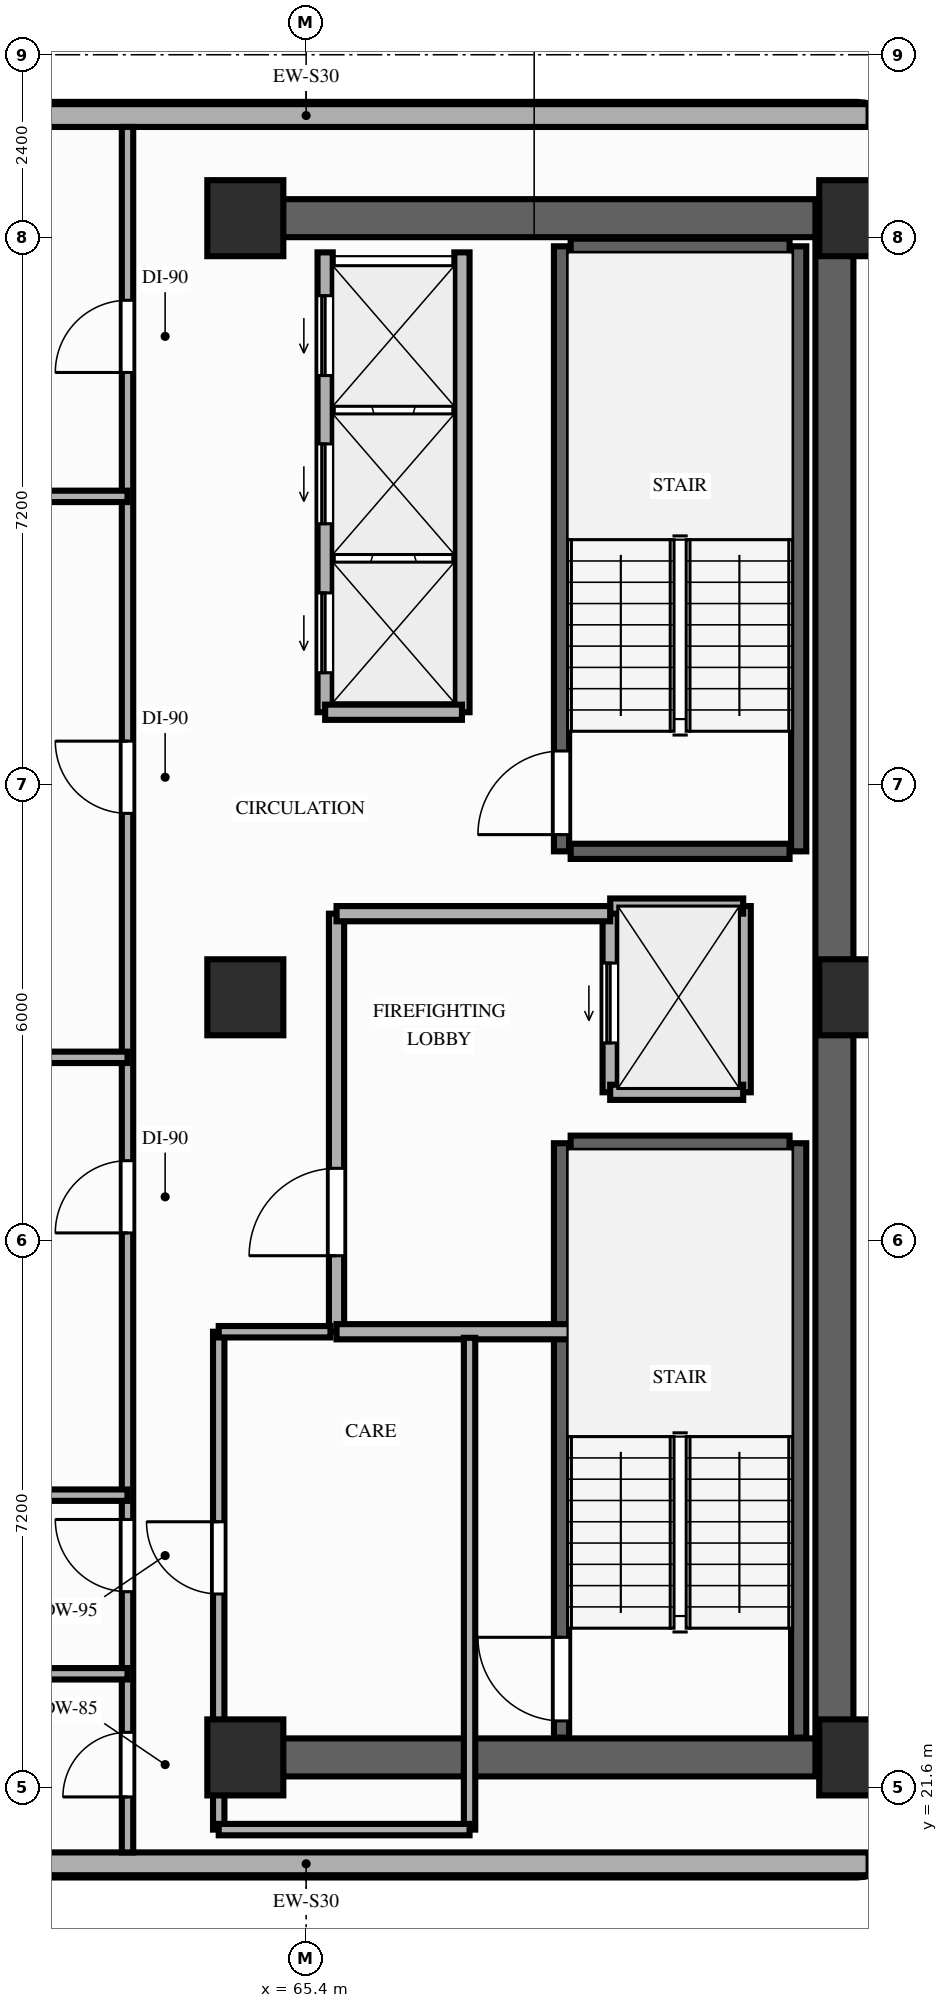
"""IFC4 building model, lengths in metres.
Left out: names, types, materials, properties, quantities, classifications, styles, units other than length and angle.
Written with IfcOpenShell. Run it as: python <this file> out.ifc"""

import sys

from ifc_helpers import new_model, si_unit, direction, frame, frame_2d, origin, origin_2d, place, context, subcontext, project, spatial, rectangle, extrude, element, fill, save


model = new_model("IFC4")
c1 = context("Model", 3, precision=1e-05, world=origin(), true_north=direction((0.0, 1.0)))
c2 = subcontext(c1, "Body", "Model", "MODEL_VIEW")
j1 = project(units=[si_unit("LENGTHUNIT", "METRE"), si_unit("PLANEANGLEUNIT", "RADIAN")], contexts=[c1])
p1 = place(None, origin())
s1 = spatial("IfcSite", under=j1, at=p1, CompositionType="ELEMENT")
p2 = place(p1, origin())
s2 = spatial("IfcBuilding", under=s1, at=p2, CompositionType="ELEMENT")
p3 = place(p2, frame((0.0, 0.0, 93.0)))
s3 = spatial("IfcBuildingStorey", under=s2, at=p3, CompositionType="ELEMENT", Elevation=93.0)
for number, where, z_axis, x_axis in (
    (1, (64.6, 22.0, 0.0), (0.0, 0.0, 1.0), (1.0, 0.0, 0.0)),
    (2, (72.65, 22.0, 0.0), (0.0, 0.0, 1.0), (1.0, 0.0, 0.0)),
    (3, (64.6, 32.0, 0.0), (0.0, 0.0, 1.0), (1.0, 0.0, 0.0)),
    (4, (72.65, 32.0, 0.0), (0.0, 0.0, 1.0), (1.0, 0.0, 0.0)),
    (5, (64.6, 42.25, 0.0), (0.0, 0.0, 1.0), (1.0, 0.0, 0.0)),
    (6, (72.65, 42.25, 0.0), (0.0, 0.0, 1.0), (1.0, 0.0, 0.0)),
):
    element("IfcColumn", number, at=place(p3, frame(where, z_axis=z_axis, x_axis=x_axis)), inside=s3, PredefinedType="COLUMN", context=c2, shape_type="SweptSolid", body=[
        extrude(rectangle(XDim=1.0, YDim=1.0, at=origin_2d()), origin(), (0.0, 0.0, 1.0), 3.2),
    ])
for number, where, z_axis, x_axis in (
    (7, (72.8, 43.6, 0.0), (0.0, 0.0, 1.0), (-1.0, 0.0, 0.0)),
    (8, (58.0, 20.6, 0.0), (0.0, 0.0, 1.0), (1.0, 0.0, 0.0)),
):
    element("IfcWall", number, at=place(p3, frame(where, z_axis=z_axis, x_axis=x_axis)), inside=s3, PredefinedType="STANDARD", context=c2, shape_type="SweptSolid", body=[
        extrude(rectangle(XDim=14.8, YDim=0.3, at=frame_2d((7.4, 0.0))), origin(), (0.0, 0.0, 1.0), 3.02),
    ])
p4 = place(p3, frame((72.35, 22.0, 0.0), z_axis=(0.0, 0.0, 1.0), x_axis=(0.0, 1.0, 0.0)))
e9 = element("IfcWall", 9, at=p4, inside=s3, PredefinedType="SHEAR", context=c2, shape_type="SweptSolid", body=[
    extrude(rectangle(XDim=20.25, YDim=0.5, at=frame_2d((10.125, 0.0))), origin(), (0.0, 0.0, 1.0), 3.02),
])
for number, where, z_axis, x_axis in (
    (10, (64.6, 42.25, 0.0), (0.0, 0.0, 1.0), (1.0, 0.0, 0.0)),
    (11, (64.6, 22.0, 0.0), (0.0, 0.0, 1.0), (1.0, 0.0, 0.0)),
):
    element("IfcWall", number, at=place(p3, frame(where, z_axis=z_axis, x_axis=x_axis)), inside=s3, PredefinedType="SHEAR", context=c2, shape_type="SweptSolid", body=[
        extrude(rectangle(XDim=7.5, YDim=0.5, at=frame_2d((3.75, 0.0))), origin(), (0.0, 0.0, 1.0), 3.02),
    ])
p5 = place(p3, frame((68.76, 22.26, 0.0), z_axis=(0.0, 0.0, 1.0), x_axis=(0.0, 1.0, 0.0)))
e12 = element("IfcWall", 12, at=p5, inside=s3, PredefinedType="SHEAR", context=c2, shape_type="SweptSolid", body=[
    extrude(rectangle(XDim=7.82, YDim=0.2, at=frame_2d((3.91, 0.0))), origin(), (0.0, 0.0, 1.0), 3.02),
])
p6 = place(p5, frame((0.22, 0.0, 0.0)))
e13 = element("IfcOpeningElement", 13, at=p6, cuts=e12, PredefinedType="OPENING", context=c2, shape_type="SweptSolid", body=[
    extrude(rectangle(XDim=1.1, YDim=2.15, at=frame_2d((0.55, 1.075))), frame((0.0, 0.11, 0.0), z_axis=(0.0, -1.0, 0.0), x_axis=(1.0, 0.0, 0.0)), (0.0, 0.0, 1.0), 0.22),
])
p7 = place(p3, frame((71.88, 22.26, 0.0), z_axis=(0.0, 0.0, 1.0), x_axis=(0.0, 1.0, 0.0)))
e14 = element("IfcWall", 14, at=p7, inside=s3, PredefinedType="SHEAR", context=c2, shape_type="SweptSolid", body=[
    extrude(rectangle(XDim=7.82, YDim=0.2, at=frame_2d((3.91, 0.0))), origin(), (0.0, 0.0, 1.0), 3.02),
])
p8 = place(p3, frame((68.88, 30.08, 0.0), z_axis=(0.0, 0.0, 1.0), x_axis=(1.0, 0.0, 0.0)))
e15 = element("IfcWall", 15, at=p8, inside=s3, PredefinedType="SHEAR", context=c2, shape_type="SweptSolid", body=[
    extrude(rectangle(XDim=2.88, YDim=0.2, at=frame_2d((1.44, 0.0))), origin(), (0.0, 0.0, 1.0), 3.02),
])
p9 = place(p3, frame((68.76, 33.92, 0.0), z_axis=(0.0, 0.0, 1.0), x_axis=(0.0, 1.0, 0.0)))
e16 = element("IfcWall", 16, at=p9, inside=s3, PredefinedType="SHEAR", context=c2, shape_type="SweptSolid", body=[
    extrude(rectangle(XDim=7.96, YDim=0.2, at=frame_2d((3.98, 0.0))), origin(), (0.0, 0.0, 1.0), 3.02),
])
p10 = place(p9, frame((0.22, 0.0, 0.0)))
e17 = element("IfcOpeningElement", 17, at=p10, cuts=e16, PredefinedType="OPENING", context=c2, shape_type="SweptSolid", body=[
    extrude(rectangle(XDim=1.1, YDim=2.15, at=frame_2d((0.55, 1.075))), frame((0.0, 0.11, 0.0), z_axis=(0.0, -1.0, 0.0), x_axis=(1.0, 0.0, 0.0)), (0.0, 0.0, 1.0), 0.22),
])
p11 = place(p3, frame((71.88, 33.92, 0.0), z_axis=(0.0, 0.0, 1.0), x_axis=(0.0, 1.0, 0.0)))
e18 = element("IfcWall", 18, at=p11, inside=s3, PredefinedType="SHEAR", context=c2, shape_type="SweptSolid", body=[
    extrude(rectangle(XDim=7.96, YDim=0.2, at=frame_2d((3.98, 0.0))), origin(), (0.0, 0.0, 1.0), 3.02),
])
for number, where, z_axis, x_axis in (
    (19, (68.88, 41.88, 0.0), (0.0, 0.0, 1.0), (1.0, 0.0, 0.0)),
    (20, (68.88, 33.92, 0.0), (0.0, 0.0, 1.0), (1.0, 0.0, 0.0)),
):
    element("IfcWall", number, at=place(p3, frame(where, z_axis=z_axis, x_axis=x_axis)), inside=s3, PredefinedType="SHEAR", context=c2, shape_type="SweptSolid", body=[
        extrude(rectangle(XDim=2.88, YDim=0.2, at=frame_2d((1.44, 0.0))), origin(), (0.0, 0.0, 1.0), 3.02),
    ])
p12 = place(p3, frame((65.65, 35.75, 0.0), z_axis=(0.0, 0.0, 1.0), x_axis=(0.0, 1.0, 0.0)))
e21 = element("IfcWall", 21, at=p12, inside=s3, PredefinedType="MOVABLE", context=c2, shape_type="SweptSolid", body=[
    extrude(rectangle(XDim=6.05, YDim=0.2, at=frame_2d((3.025, 0.0))), origin(), (0.0, 0.0, 1.0), 3.02),
])
p13 = place(p12, frame((0.52, 0.0, 0.0)))
e22 = element("IfcOpeningElement", 22, at=p13, cuts=e21, PredefinedType="OPENING", context=c2, shape_type="SweptSolid", body=[
    extrude(rectangle(XDim=1.05, YDim=2.15, at=frame_2d((0.525, 1.075))), frame((0.0, 0.11, 0.0), z_axis=(0.0, -1.0, 0.0), x_axis=(1.0, 0.0, 0.0)), (0.0, 0.0, 1.0), 0.22),
])
p14 = place(p12, frame((2.48, 0.0, 0.0)))
e23 = element("IfcOpeningElement", 23, at=p14, cuts=e21, PredefinedType="OPENING", context=c2, shape_type="SweptSolid", body=[
    extrude(rectangle(XDim=1.05, YDim=2.15, at=frame_2d((0.525, 1.075))), frame((0.0, 0.11, 0.0), z_axis=(0.0, -1.0, 0.0), x_axis=(1.0, 0.0, 0.0)), (0.0, 0.0, 1.0), 0.22),
])
p15 = place(p12, frame((4.43, 0.0, 0.0)))
e24 = element("IfcOpeningElement", 24, at=p15, cuts=e21, PredefinedType="OPENING", context=c2, shape_type="SweptSolid", body=[
    extrude(rectangle(XDim=1.05, YDim=2.15, at=frame_2d((0.525, 1.075))), frame((0.0, 0.11, 0.0), z_axis=(0.0, -1.0, 0.0), x_axis=(1.0, 0.0, 0.0)), (0.0, 0.0, 1.0), 0.22),
])
p16 = place(p3, frame((67.45, 35.75, 0.0), z_axis=(0.0, 0.0, 1.0), x_axis=(0.0, 1.0, 0.0)))
e25 = element("IfcWall", 25, at=p16, inside=s3, PredefinedType="MOVABLE", context=c2, shape_type="SweptSolid", body=[
    extrude(rectangle(XDim=6.05, YDim=0.2, at=frame_2d((3.025, 0.0))), origin(), (0.0, 0.0, 1.0), 3.02),
])
p17 = place(p3, frame((65.65, 35.75, 0.0), z_axis=(0.0, 0.0, 1.0), x_axis=(1.0, 0.0, 0.0)))
e26 = element("IfcWall", 26, at=p17, inside=s3, PredefinedType="MOVABLE", context=c2, shape_type="SweptSolid", body=[
    extrude(rectangle(XDim=1.8, YDim=0.2, at=frame_2d((0.9, 0.0))), origin(), (0.0, 0.0, 1.0), 3.02),
])
p18 = place(p3, frame((69.4, 30.75, 0.0), z_axis=(0.0, 0.0, 1.0), x_axis=(0.0, 1.0, 0.0)))
e27 = element("IfcWall", 27, at=p18, inside=s3, PredefinedType="MOVABLE", context=c2, shape_type="SweptSolid", body=[
    extrude(rectangle(XDim=2.45, YDim=0.2, at=frame_2d((1.225, 0.0))), origin(), (0.0, 0.0, 1.0), 3.02),
])
p19 = place(p18, frame((0.65, 0.0, 0.0)))
e28 = element("IfcOpeningElement", 28, at=p19, cuts=e27, PredefinedType="OPENING", context=c2, shape_type="SweptSolid", body=[
    extrude(rectangle(XDim=1.05, YDim=2.15, at=frame_2d((0.525, 1.075))), frame((0.0, 0.11, 0.0), z_axis=(0.0, -1.0, 0.0), x_axis=(1.0, 0.0, 0.0)), (0.0, 0.0, 1.0), 0.22),
])
p20 = place(p3, frame((71.15, 30.75, 0.0), z_axis=(0.0, 0.0, 1.0), x_axis=(0.0, 1.0, 0.0)))
e29 = element("IfcWall", 29, at=p20, inside=s3, PredefinedType="MOVABLE", context=c2, shape_type="SweptSolid", body=[
    extrude(rectangle(XDim=2.45, YDim=0.2, at=frame_2d((1.225, 0.0))), origin(), (0.0, 0.0, 1.0), 3.02),
])
for number, where, z_axis, x_axis in (
    (30, (69.4, 33.2, 0.0), (0.0, 0.0, 1.0), (1.0, 0.0, 0.0)),
    (31, (69.4, 30.75, 0.0), (0.0, 0.0, 1.0), (1.0, 0.0, 0.0)),
):
    element("IfcWall", number, at=place(p3, frame(where, z_axis=z_axis, x_axis=x_axis)), inside=s3, PredefinedType="MOVABLE", context=c2, shape_type="SweptSolid", body=[
        extrude(rectangle(XDim=1.75, YDim=0.2, at=frame_2d((0.875, 0.0))), origin(), (0.0, 0.0, 1.0), 3.02),
    ])
p21 = place(p3, frame((65.8, 27.6, 0.0), z_axis=(0.0, 0.0, 1.0), x_axis=(0.0, 1.0, 0.0)))
e32 = element("IfcWall", 32, at=p21, inside=s3, PredefinedType="PARTITIONING", context=c2, shape_type="SweptSolid", body=[
    extrude(rectangle(XDim=5.5, YDim=0.2, at=frame_2d((2.75, 0.0))), origin(), (0.0, 0.0, 1.0), 3.02),
])
p22 = place(p21, frame((1.0, 0.0, 0.0)))
e33 = element("IfcOpeningElement", 33, at=p22, cuts=e32, PredefinedType="OPENING", context=c2, shape_type="SweptSolid", body=[
    extrude(rectangle(XDim=1.15, YDim=2.15, at=frame_2d((0.575, 1.075))), frame((0.0, 0.11, 0.0), z_axis=(0.0, -1.0, 0.0), x_axis=(1.0, 0.0, 0.0)), (0.0, 0.0, 1.0), 0.22),
])
p23 = place(p3, frame((65.8, 33.1, 0.0), z_axis=(0.0, 0.0, 1.0), x_axis=(1.0, 0.0, 0.0)))
e34 = element("IfcWall", 34, at=p23, inside=s3, PredefinedType="PARTITIONING", context=c2, shape_type="SweptSolid", body=[
    extrude(rectangle(XDim=3.6, YDim=0.2, at=frame_2d((1.8, 0.0))), origin(), (0.0, 0.0, 1.0), 3.02),
])
p24 = place(p3, frame((65.8, 27.6, 0.0), z_axis=(0.0, 0.0, 1.0), x_axis=(1.0, 0.0, 0.0)))
e35 = element("IfcWall", 35, at=p24, inside=s3, PredefinedType="PARTITIONING", context=c2, shape_type="SweptSolid", body=[
    extrude(rectangle(XDim=3.4, YDim=0.2, at=frame_2d((1.7, 0.0))), origin(), (0.0, 0.0, 1.0), 3.02),
])
p25 = place(p3, frame((64.25, 21.05, 0.0), z_axis=(0.0, 0.0, 1.0), x_axis=(0.0, 1.0, 0.0)))
e36 = element("IfcWall", 36, at=p25, inside=s3, PredefinedType="PARTITIONING", context=c2, shape_type="SweptSolid", body=[
    extrude(rectangle(XDim=6.55, YDim=0.15, at=frame_2d((3.275, 0.0))), origin(), (0.0, 0.0, 1.0), 2.6),
])
p26 = place(p25, frame((3.1, 0.0, 0.0)))
e37 = element("IfcOpeningElement", 37, at=p26, cuts=e36, PredefinedType="OPENING", context=c2, shape_type="SweptSolid", body=[
    extrude(rectangle(XDim=0.95, YDim=2.15, at=frame_2d((0.475, 1.075))), frame((0.0, 0.085, 0.0), z_axis=(0.0, -1.0, 0.0), x_axis=(1.0, 0.0, 0.0)), (0.0, 0.0, 1.0), 0.17),
])
p27 = place(p3, frame((67.55, 21.05, 0.0), z_axis=(0.0, 0.0, 1.0), x_axis=(0.0, 1.0, 0.0)))
e38 = element("IfcWall", 38, at=p27, inside=s3, PredefinedType="PARTITIONING", context=c2, shape_type="SweptSolid", body=[
    extrude(rectangle(XDim=6.47, YDim=0.15, at=frame_2d((3.235, 0.0))), origin(), (0.0, 0.0, 1.0), 2.6),
])
p28 = place(p3, frame((64.25, 21.05, 0.0), z_axis=(0.0, 0.0, 1.0), x_axis=(1.0, 0.0, 0.0)))
e39 = element("IfcWall", 39, at=p28, inside=s3, PredefinedType="PARTITIONING", context=c2, shape_type="SweptSolid", body=[
    extrude(rectangle(XDim=3.3, YDim=0.15, at=frame_2d((1.65, 0.0))), origin(), (0.0, 0.0, 1.0), 3.02),
])
p29 = place(p3, frame((64.25, 27.6, 0.0), z_axis=(0.0, 0.0, 1.0), x_axis=(1.0, 0.0, 0.0)))
e40 = element("IfcWall", 40, at=p29, inside=s3, PredefinedType="PARTITIONING", context=c2, shape_type="SweptSolid", body=[
    extrude(rectangle(XDim=1.47, YDim=0.15, at=frame_2d((0.735, 0.0))), origin(), (0.0, 0.0, 1.0), 2.6),
])
p30 = place(p3, frame((63.05, 20.75, 0.0), z_axis=(0.0, 0.0, 1.0), x_axis=(0.0, 1.0, 0.0)))
e41 = element("IfcWall", 41, at=p30, inside=s3, PredefinedType="PARTITIONING", context=c2, shape_type="SweptSolid", body=[
    extrude(rectangle(XDim=22.7, YDim=0.15, at=frame_2d((11.35, 0.0))), origin(), (0.0, 0.0, 1.0), 2.6),
])
p31 = place(p30, frame((0.73, 0.0, 0.0)))
e42 = element("IfcOpeningElement", 42, at=p31, cuts=e41, PredefinedType="OPENING", context=c2, shape_type="SweptSolid", body=[
    extrude(rectangle(XDim=0.85, YDim=2.1, at=frame_2d((0.425, 1.05))), frame((0.0, 0.085, 0.0), z_axis=(0.0, -1.0, 0.0), x_axis=(1.0, 0.0, 0.0)), (0.0, 0.0, 1.0), 0.17),
])
p32 = place(p30, frame((3.43, 0.0, 0.0)))
e43 = element("IfcOpeningElement", 43, at=p32, cuts=e41, PredefinedType="OPENING", context=c2, shape_type="SweptSolid", body=[
    extrude(rectangle(XDim=0.95, YDim=2.1, at=frame_2d((0.475, 1.05))), frame((0.0, 0.085, 0.0), z_axis=(0.0, -1.0, 0.0), x_axis=(1.0, 0.0, 0.0)), (0.0, 0.0, 1.0), 0.17),
])
p33 = place(p30, frame((8.15, 0.0, 0.0)))
e44 = element("IfcOpeningElement", 44, at=p33, cuts=e41, PredefinedType="OPENING", context=c2, shape_type="SweptSolid", body=[
    extrude(rectangle(XDim=0.95, YDim=2.15, at=frame_2d((0.475, 1.075))), frame((0.0, 0.085, 0.0), z_axis=(0.0, -1.0, 0.0), x_axis=(1.0, 0.0, 0.0)), (0.0, 0.0, 1.0), 0.17),
])
p34 = place(p30, frame((13.67, 0.0, 0.0)))
e45 = element("IfcOpeningElement", 45, at=p34, cuts=e41, PredefinedType="OPENING", context=c2, shape_type="SweptSolid", body=[
    extrude(rectangle(XDim=0.95, YDim=2.15, at=frame_2d((0.475, 1.075))), frame((0.0, 0.085, 0.0), z_axis=(0.0, -1.0, 0.0), x_axis=(1.0, 0.0, 0.0)), (0.0, 0.0, 1.0), 0.17),
])
p35 = place(p30, frame((19.47, 0.0, 0.0)))
e46 = element("IfcOpeningElement", 46, at=p35, cuts=e41, PredefinedType="OPENING", context=c2, shape_type="SweptSolid", body=[
    extrude(rectangle(XDim=0.95, YDim=2.15, at=frame_2d((0.475, 1.075))), frame((0.0, 0.085, 0.0), z_axis=(0.0, -1.0, 0.0), x_axis=(1.0, 0.0, 0.0)), (0.0, 0.0, 1.0), 0.17),
])
for number, where, z_axis, x_axis in (
    (47, (57.95, 23.1, 0.0), (0.0, 0.0, 1.0), (1.0, 0.0, 0.0)),
    (48, (57.95, 25.45, 0.0), (0.0, 0.0, 1.0), (1.0, 0.0, 0.0)),
    (49, (57.95, 31.21, 0.0), (0.0, 0.0, 1.0), (1.0, 0.0, 0.0)),
    (50, (57.95, 38.59, 0.0), (0.0, 0.0, 1.0), (1.0, 0.0, 0.0)),
):
    element("IfcWall", number, at=place(p3, frame(where, z_axis=z_axis, x_axis=x_axis)), inside=s3, PredefinedType="PARTITIONING", context=c2, shape_type="SweptSolid", body=[
        extrude(rectangle(XDim=5.1, YDim=0.15, at=frame_2d((2.55, 0.0))), origin(), (0.0, 0.0, 1.0), 2.6),
    ])
p36 = place(p6, origin())
e51 = element("IfcDoor", 51, at=p36, inside=s3, OperationType="SINGLE_SWING_RIGHT", PredefinedType="DOOR", context=c2, shape_type="SweptSolid", body=[
    extrude(rectangle(XDim=1.1, YDim=2.15, at=frame_2d((0.55, 1.075))), frame((0.0, 0.025, 0.0), z_axis=(0.0, -1.0, 0.0), x_axis=(1.0, 0.0, 0.0)), (0.0, 0.0, 1.0), 0.05),
])
fill(e13, e51)
p37 = place(p10, origin())
e52 = element("IfcDoor", 52, at=p37, inside=s3, OperationType="SINGLE_SWING_LEFT", PredefinedType="DOOR", context=c2, shape_type="SweptSolid", body=[
    extrude(rectangle(XDim=1.1, YDim=2.15, at=frame_2d((0.55, 1.075))), frame((0.0, 0.025, 0.0), z_axis=(0.0, -1.0, 0.0), x_axis=(1.0, 0.0, 0.0)), (0.0, 0.0, 1.0), 0.05),
])
fill(e17, e52)
p38 = place(p13, origin())
e53 = element("IfcDoor", 53, at=p38, inside=s3, OperationType="SLIDING_TO_LEFT", PredefinedType="DOOR", context=c2, shape_type="SweptSolid", body=[
    extrude(rectangle(XDim=1.05, YDim=2.15, at=frame_2d((0.525, 1.075))), frame((0.0, 0.025, 0.0), z_axis=(0.0, -1.0, 0.0), x_axis=(1.0, 0.0, 0.0)), (0.0, 0.0, 1.0), 0.05),
])
fill(e22, e53)
p39 = place(p14, origin())
e54 = element("IfcDoor", 54, at=p39, inside=s3, OperationType="SLIDING_TO_LEFT", PredefinedType="DOOR", context=c2, shape_type="SweptSolid", body=[
    extrude(rectangle(XDim=1.05, YDim=2.15, at=frame_2d((0.525, 1.075))), frame((0.0, 0.025, 0.0), z_axis=(0.0, -1.0, 0.0), x_axis=(1.0, 0.0, 0.0)), (0.0, 0.0, 1.0), 0.05),
])
fill(e23, e54)
p40 = place(p15, origin())
e55 = element("IfcDoor", 55, at=p40, inside=s3, OperationType="SLIDING_TO_LEFT", PredefinedType="DOOR", context=c2, shape_type="SweptSolid", body=[
    extrude(rectangle(XDim=1.05, YDim=2.15, at=frame_2d((0.525, 1.075))), frame((0.0, 0.025, 0.0), z_axis=(0.0, -1.0, 0.0), x_axis=(1.0, 0.0, 0.0)), (0.0, 0.0, 1.0), 0.05),
])
fill(e24, e55)
p41 = place(p19, origin())
e56 = element("IfcDoor", 56, at=p41, inside=s3, OperationType="SLIDING_TO_LEFT", PredefinedType="DOOR", context=c2, shape_type="SweptSolid", body=[
    extrude(rectangle(XDim=1.05, YDim=2.15, at=frame_2d((0.525, 1.075))), frame((0.0, 0.025, 0.0), z_axis=(0.0, -1.0, 0.0), x_axis=(1.0, 0.0, 0.0)), (0.0, 0.0, 1.0), 0.05),
])
fill(e28, e56)
p42 = place(p22, origin())
e57 = element("IfcDoor", 57, at=p42, inside=s3, OperationType="SINGLE_SWING_LEFT", PredefinedType="DOOR", context=c2, shape_type="SweptSolid", body=[
    extrude(rectangle(XDim=1.15, YDim=2.15, at=frame_2d((0.575, 1.075))), frame((0.0, 0.025, 0.0), z_axis=(0.0, -1.0, 0.0), x_axis=(1.0, 0.0, 0.0)), (0.0, 0.0, 1.0), 0.05),
])
fill(e33, e57)
p43 = place(p26, origin())
e58 = element("IfcDoor", 58, at=p43, inside=s3, OperationType="SINGLE_SWING_RIGHT", PredefinedType="DOOR", context=c2, shape_type="SweptSolid", body=[
    extrude(rectangle(XDim=0.95, YDim=2.15, at=frame_2d((0.475, 1.075))), frame((0.0, 0.025, 0.0), z_axis=(0.0, -1.0, 0.0), x_axis=(1.0, 0.0, 0.0)), (0.0, 0.0, 1.0), 0.05),
])
fill(e37, e58)
p44 = place(p31, origin())
e59 = element("IfcDoor", 59, at=p44, inside=s3, OperationType="SINGLE_SWING_LEFT", PredefinedType="DOOR", context=c2, shape_type="SweptSolid", body=[
    extrude(rectangle(XDim=0.85, YDim=2.1, at=frame_2d((0.425, 1.05))), frame((0.0, 0.025, 0.0), z_axis=(0.0, -1.0, 0.0), x_axis=(1.0, 0.0, 0.0)), (0.0, 0.0, 1.0), 0.05),
])
fill(e42, e59)
p45 = place(p32, origin())
e60 = element("IfcDoor", 60, at=p45, inside=s3, OperationType="SINGLE_SWING_RIGHT", PredefinedType="DOOR", context=c2, shape_type="SweptSolid", body=[
    extrude(rectangle(XDim=0.95, YDim=2.1, at=frame_2d((0.475, 1.05))), frame((0.0, 0.025, 0.0), z_axis=(0.0, -1.0, 0.0), x_axis=(1.0, 0.0, 0.0)), (0.0, 0.0, 1.0), 0.05),
])
fill(e43, e60)
p46 = place(p33, origin())
e61 = element("IfcDoor", 61, at=p46, inside=s3, OperationType="SINGLE_SWING_LEFT", PredefinedType="DOOR", context=c2, shape_type="SweptSolid", body=[
    extrude(rectangle(XDim=0.95, YDim=2.15, at=frame_2d((0.475, 1.075))), frame((0.0, 0.025, 0.0), z_axis=(0.0, -1.0, 0.0), x_axis=(1.0, 0.0, 0.0)), (0.0, 0.0, 1.0), 0.05),
])
fill(e44, e61)
p47 = place(p34, origin())
e62 = element("IfcDoor", 62, at=p47, inside=s3, OperationType="SINGLE_SWING_RIGHT", PredefinedType="DOOR", context=c2, shape_type="SweptSolid", body=[
    extrude(rectangle(XDim=0.95, YDim=2.15, at=frame_2d((0.475, 1.075))), frame((0.0, 0.025, 0.0), z_axis=(0.0, -1.0, 0.0), x_axis=(1.0, 0.0, 0.0)), (0.0, 0.0, 1.0), 0.05),
])
fill(e45, e62)
p48 = place(p35, origin())
e63 = element("IfcDoor", 63, at=p48, inside=s3, OperationType="SINGLE_SWING_LEFT", PredefinedType="DOOR", context=c2, shape_type="SweptSolid", body=[
    extrude(rectangle(XDim=0.95, YDim=2.15, at=frame_2d((0.475, 1.075))), frame((0.0, 0.025, 0.0), z_axis=(0.0, -1.0, 0.0), x_axis=(1.0, 0.0, 0.0)), (0.0, 0.0, 1.0), 0.05),
])
fill(e46, e63)
save(model, sys.argv[1])
